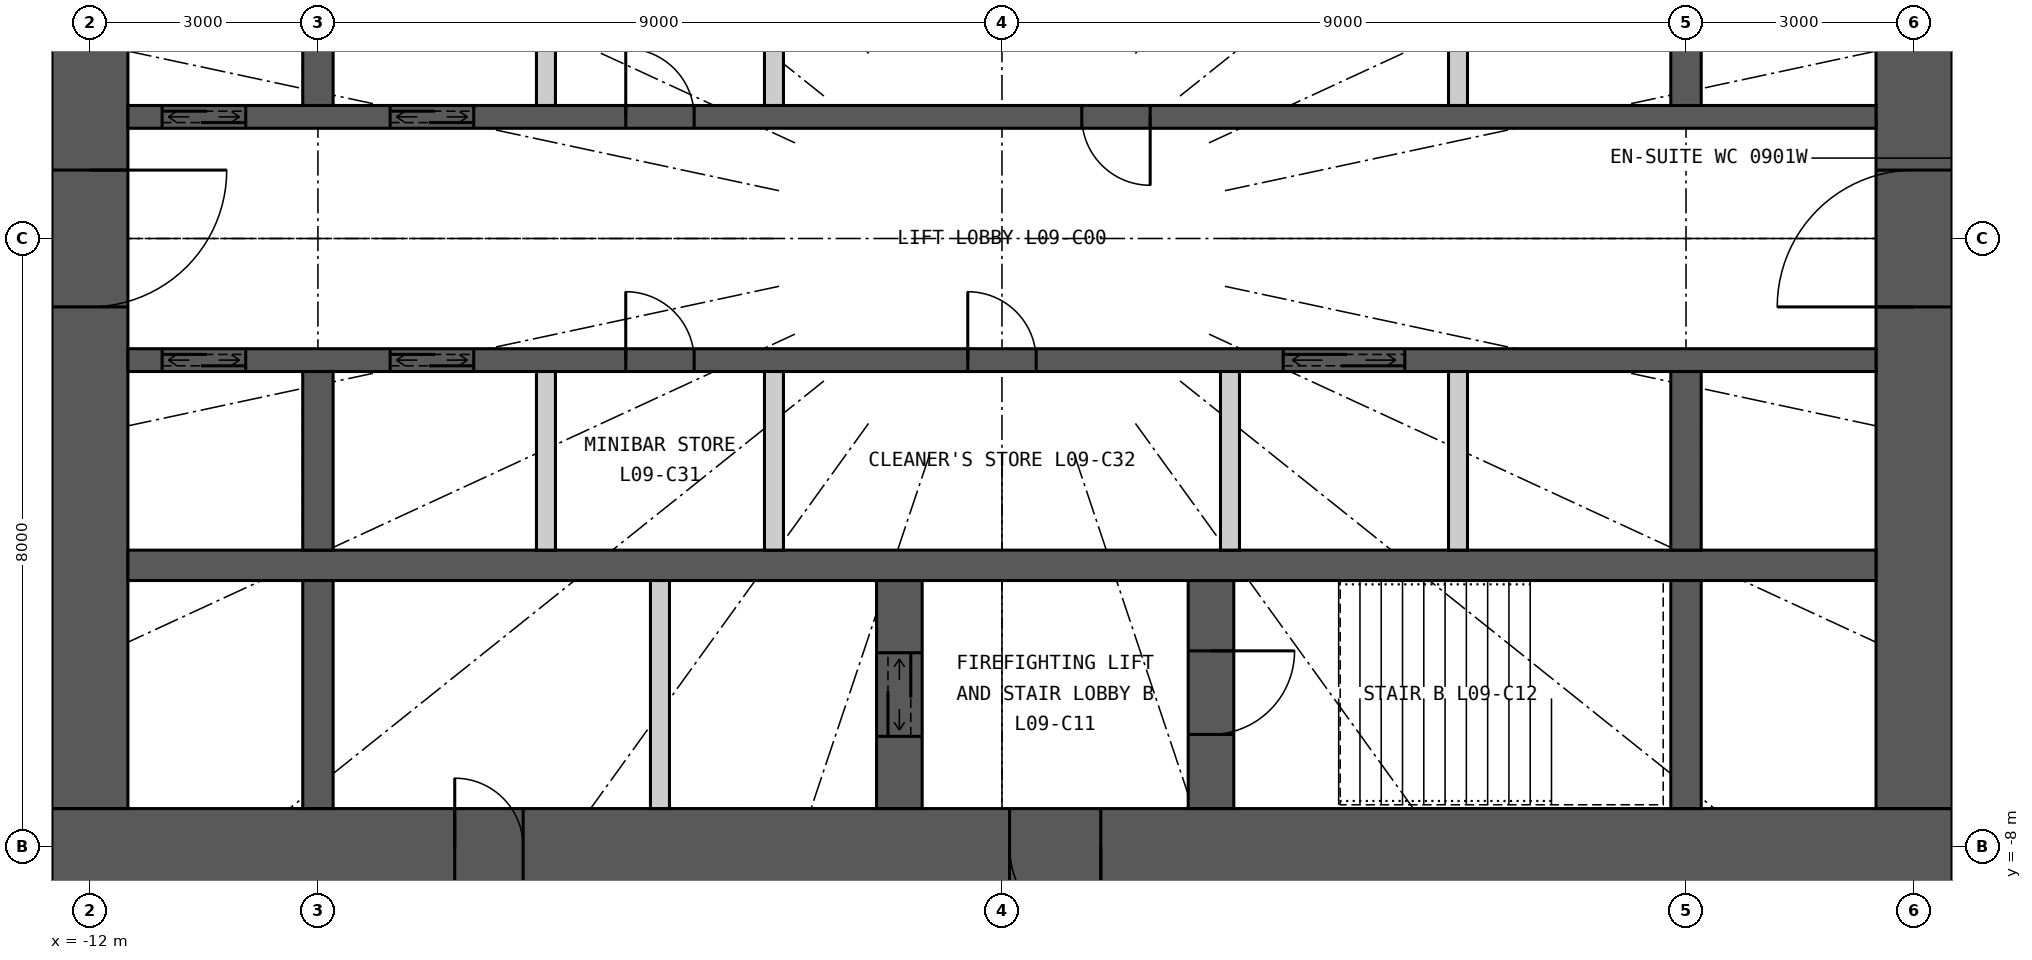
"""IFC4 building model, lengths in metres.
Left out: names, types, materials, properties, quantities, classifications, styles, units other than length and angle.
Written with IfcOpenShell. Run it as: python <this file> out.ifc"""

import sys

from ifc_helpers import new_model, si_unit, direction, frame, frame_2d, origin, place, context, subcontext, project, spatial, rectangle, extrude, element, fill, save


model = new_model("IFC4")
c1 = context("Model", 3, precision=1e-05, world=origin(), true_north=direction((0.0, 1.0)))
c2 = subcontext(c1, "Body", "Model", "MODEL_VIEW")
j1 = project(units=[si_unit("LENGTHUNIT", "METRE"), si_unit("PLANEANGLEUNIT", "RADIAN")], contexts=[c1])
p1 = place(None, origin())
s1 = spatial("IfcSite", under=j1, at=p1, CompositionType="ELEMENT")
p2 = place(p1, origin())
s2 = spatial("IfcBuilding", under=s1, at=p2, CompositionType="ELEMENT")
p3 = place(p2, frame((0.0, 0.0, 42.6)))
s3 = spatial("IfcBuildingStorey", under=s2, at=p3, CompositionType="ELEMENT", Elevation=42.6)
p4 = place(p3, frame((12.5, -8.0, 0.0), z_axis=(0.0, 0.0, 1.0), x_axis=(-1.0, 0.0, 0.0)))
e1 = element("IfcWall", 1, at=p4, inside=s3, PredefinedType="SHEAR", context=c2, shape_type="SweptSolid", body=[
    extrude(rectangle(XDim=25.0, YDim=1.0, at=frame_2d((12.5, 0.0))), origin(), (0.0, 0.0, 1.0), 3.3),
])
p5 = place(p4, frame((11.2, 0.0, 0.0)))
e2 = element("IfcOpeningElement", 2, at=p5, cuts=e1, PredefinedType="OPENING", context=c2, shape_type="SweptSolid", body=[
    extrude(rectangle(XDim=1.2, YDim=2.2, at=frame_2d((0.6, 1.1))), frame((0.0, 0.51, 0.0), z_axis=(0.0, -1.0, 0.0), x_axis=(1.0, 0.0, 0.0)), (0.0, 0.0, 1.0), 1.02),
])
p6 = place(p4, frame((18.8, 0.0, 0.0)))
e3 = element("IfcOpeningElement", 3, at=p6, cuts=e1, PredefinedType="OPENING", context=c2, shape_type="SweptSolid", body=[
    extrude(rectangle(XDim=0.9, YDim=2.2, at=frame_2d((0.45, 1.1))), frame((0.0, 0.51, 0.0), z_axis=(0.0, -1.0, 0.0), x_axis=(1.0, 0.0, 0.0)), (0.0, 0.0, 1.0), 1.02),
])
p7 = place(p3, frame((12.0, -7.5, 0.0), z_axis=(0.0, 0.0, 1.0), x_axis=(0.0, 1.0, 0.0)))
e4 = element("IfcWall", 4, at=p7, inside=s3, PredefinedType="SHEAR", context=c2, shape_type="SweptSolid", body=[
    extrude(rectangle(XDim=15.0, YDim=1.0, at=frame_2d((7.5, 0.0))), origin(), (0.0, 0.0, 1.0), 3.3),
])
p8 = place(p7, frame((6.6, 0.0, 0.0)))
e5 = element("IfcOpeningElement", 5, at=p8, cuts=e4, PredefinedType="OPENING", context=c2, shape_type="SweptSolid", body=[
    extrude(rectangle(XDim=1.8, YDim=2.2, at=frame_2d((0.9, 1.1))), frame((0.0, 0.51, 0.0), z_axis=(0.0, -1.0, 0.0), x_axis=(1.0, 0.0, 0.0)), (0.0, 0.0, 1.0), 1.02),
])
p9 = place(p3, frame((-12.0, 7.5, 0.0), z_axis=(0.0, 0.0, 1.0), x_axis=(0.0, -1.0, 0.0)))
e6 = element("IfcWall", 6, at=p9, inside=s3, PredefinedType="SHEAR", context=c2, shape_type="SweptSolid", body=[
    extrude(rectangle(XDim=15.0, YDim=1.0, at=frame_2d((7.5, 0.0))), origin(), (0.0, 0.0, 1.0), 3.3),
])
p10 = place(p9, frame((6.6, 0.0, 0.0)))
e7 = element("IfcOpeningElement", 7, at=p10, cuts=e6, PredefinedType="OPENING", context=c2, shape_type="SweptSolid", body=[
    extrude(rectangle(XDim=1.8, YDim=2.2, at=frame_2d((0.9, 1.1))), frame((0.0, 0.51, 0.0), z_axis=(0.0, -1.0, 0.0), x_axis=(1.0, 0.0, 0.0)), (0.0, 0.0, 1.0), 1.02),
])
p11 = place(p3, frame((-11.5, 1.6, 0.0), z_axis=(0.0, 0.0, 1.0), x_axis=(1.0, 0.0, 0.0)))
e8 = element("IfcWall", 8, at=p11, inside=s3, PredefinedType="SHEAR", context=c2, shape_type="SweptSolid", body=[
    extrude(rectangle(XDim=23.0, YDim=0.3, at=frame_2d((11.5, 0.0))), origin(), (0.0, 0.0, 1.0), 3.3),
])
p12 = place(p11, frame((0.45, 0.0, 0.0)))
e9 = element("IfcOpeningElement", 9, at=p12, cuts=e8, PredefinedType="OPENING", context=c2, shape_type="SweptSolid", body=[
    extrude(rectangle(XDim=1.1, YDim=2.2, at=frame_2d((0.55, 1.1))), frame((0.0, 0.16, 0.0), z_axis=(0.0, -1.0, 0.0), x_axis=(1.0, 0.0, 0.0)), (0.0, 0.0, 1.0), 0.32),
])
p13 = place(p11, frame((3.45, 0.0, 0.0)))
e10 = element("IfcOpeningElement", 10, at=p13, cuts=e8, PredefinedType="OPENING", context=c2, shape_type="SweptSolid", body=[
    extrude(rectangle(XDim=1.1, YDim=2.2, at=frame_2d((0.55, 1.1))), frame((0.0, 0.16, 0.0), z_axis=(0.0, -1.0, 0.0), x_axis=(1.0, 0.0, 0.0)), (0.0, 0.0, 1.0), 0.32),
])
p14 = place(p11, frame((6.55, 0.0, 0.0)))
e11 = element("IfcOpeningElement", 11, at=p14, cuts=e8, PredefinedType="OPENING", context=c2, shape_type="SweptSolid", body=[
    extrude(rectangle(XDim=0.9, YDim=2.2, at=frame_2d((0.45, 1.1))), frame((0.0, 0.16, 0.0), z_axis=(0.0, -1.0, 0.0), x_axis=(1.0, 0.0, 0.0)), (0.0, 0.0, 1.0), 0.32),
])
p15 = place(p11, frame((12.55, 0.0, 0.0)))
e12 = element("IfcOpeningElement", 12, at=p15, cuts=e8, PredefinedType="OPENING", context=c2, shape_type="SweptSolid", body=[
    extrude(rectangle(XDim=0.9, YDim=2.2, at=frame_2d((0.45, 1.1))), frame((0.0, 0.16, 0.0), z_axis=(0.0, -1.0, 0.0), x_axis=(1.0, 0.0, 0.0)), (0.0, 0.0, 1.0), 0.32),
])
p16 = place(p3, frame((-11.5, -4.3, 0.0), z_axis=(0.0, 0.0, 1.0), x_axis=(1.0, 0.0, 0.0)))
e13 = element("IfcWall", 13, at=p16, inside=s3, PredefinedType="SHEAR", context=c2, shape_type="SweptSolid", body=[
    extrude(rectangle(XDim=23.0, YDim=0.4, at=frame_2d((11.5, 0.0))), origin(), (0.0, 0.0, 1.0), 3.3),
])
p17 = place(p3, frame((-11.5, -1.6, 0.0), z_axis=(0.0, 0.0, 1.0), x_axis=(1.0, 0.0, 0.0)))
e14 = element("IfcWall", 14, at=p17, inside=s3, PredefinedType="SHEAR", context=c2, shape_type="SweptSolid", body=[
    extrude(rectangle(XDim=23.0, YDim=0.3, at=frame_2d((11.5, 0.0))), origin(), (0.0, 0.0, 1.0), 3.3),
])
p18 = place(p17, frame((0.45, 0.0, 0.0)))
e15 = element("IfcOpeningElement", 15, at=p18, cuts=e14, PredefinedType="OPENING", context=c2, shape_type="SweptSolid", body=[
    extrude(rectangle(XDim=1.1, YDim=2.2, at=frame_2d((0.55, 1.1))), frame((0.0, 0.16, 0.0), z_axis=(0.0, -1.0, 0.0), x_axis=(1.0, 0.0, 0.0)), (0.0, 0.0, 1.0), 0.32),
])
p19 = place(p17, frame((3.45, 0.0, 0.0)))
e16 = element("IfcOpeningElement", 16, at=p19, cuts=e14, PredefinedType="OPENING", context=c2, shape_type="SweptSolid", body=[
    extrude(rectangle(XDim=1.1, YDim=2.2, at=frame_2d((0.55, 1.1))), frame((0.0, 0.16, 0.0), z_axis=(0.0, -1.0, 0.0), x_axis=(1.0, 0.0, 0.0)), (0.0, 0.0, 1.0), 0.32),
])
p20 = place(p17, frame((15.2, 0.0, 0.0)))
e17 = element("IfcOpeningElement", 17, at=p20, cuts=e14, PredefinedType="OPENING", context=c2, shape_type="SweptSolid", body=[
    extrude(rectangle(XDim=1.6, YDim=2.4, at=frame_2d((0.8, 1.2))), frame((0.0, 0.16, 0.0), z_axis=(0.0, -1.0, 0.0), x_axis=(1.0, 0.0, 0.0)), (0.0, 0.0, 1.0), 0.32),
])
p21 = place(p17, frame((6.55, 0.0, 0.0)))
e18 = element("IfcOpeningElement", 18, at=p21, cuts=e14, PredefinedType="OPENING", context=c2, shape_type="SweptSolid", body=[
    extrude(rectangle(XDim=0.9, YDim=2.2, at=frame_2d((0.45, 1.1))), frame((0.0, 0.16, 0.0), z_axis=(0.0, -1.0, 0.0), x_axis=(1.0, 0.0, 0.0)), (0.0, 0.0, 1.0), 0.32),
])
p22 = place(p17, frame((11.05, 0.0, 0.0)))
e19 = element("IfcOpeningElement", 19, at=p22, cuts=e14, PredefinedType="OPENING", context=c2, shape_type="SweptSolid", body=[
    extrude(rectangle(XDim=0.9, YDim=2.2, at=frame_2d((0.45, 1.1))), frame((0.0, 0.16, 0.0), z_axis=(0.0, -1.0, 0.0), x_axis=(1.0, 0.0, 0.0)), (0.0, 0.0, 1.0), 0.32),
])
for number, where, z_axis, x_axis in (
    (20, (-9.0, 1.75, 0.0), (0.0, 0.0, 1.0), (0.0, 1.0, 0.0)),
    (21, (-9.0, -4.1, 0.0), (0.0, 0.0, 1.0), (0.0, 1.0, 0.0)),
):
    element("IfcWall", number, at=place(p3, frame(where, z_axis=z_axis, x_axis=x_axis)), inside=s3, PredefinedType="SHEAR", context=c2, shape_type="SweptSolid", body=[
        extrude(rectangle(XDim=2.35, YDim=0.4, at=frame_2d((1.175, 0.0))), origin(), (0.0, 0.0, 1.0), 3.3),
    ])
p23 = place(p3, frame((-9.0, -7.5, 0.0), z_axis=(0.0, 0.0, 1.0), x_axis=(0.0, 1.0, 0.0)))
e22 = element("IfcWall", 22, at=p23, inside=s3, PredefinedType="SHEAR", context=c2, shape_type="SweptSolid", body=[
    extrude(rectangle(XDim=3.0, YDim=0.4, at=frame_2d((1.5, 0.0))), origin(), (0.0, 0.0, 1.0), 3.3),
])
for number, where, z_axis, x_axis in (
    (23, (9.0, 1.75, 0.0), (0.0, 0.0, 1.0), (0.0, 1.0, 0.0)),
    (24, (9.0, -4.1, 0.0), (0.0, 0.0, 1.0), (0.0, 1.0, 0.0)),
):
    element("IfcWall", number, at=place(p3, frame(where, z_axis=z_axis, x_axis=x_axis)), inside=s3, PredefinedType="SHEAR", context=c2, shape_type="SweptSolid", body=[
        extrude(rectangle(XDim=2.35, YDim=0.4, at=frame_2d((1.175, 0.0))), origin(), (0.0, 0.0, 1.0), 3.3),
    ])
p24 = place(p3, frame((9.0, -7.5, 0.0), z_axis=(0.0, 0.0, 1.0), x_axis=(0.0, 1.0, 0.0)))
e25 = element("IfcWall", 25, at=p24, inside=s3, PredefinedType="SHEAR", context=c2, shape_type="SweptSolid", body=[
    extrude(rectangle(XDim=3.0, YDim=0.4, at=frame_2d((1.5, 0.0))), origin(), (0.0, 0.0, 1.0), 3.3),
])
p25 = place(p3, frame((2.75, -7.5, 0.0), z_axis=(0.0, 0.0, 1.0), x_axis=(0.0, 1.0, 0.0)))
e26 = element("IfcWall", 26, at=p25, inside=s3, PredefinedType="SHEAR", context=c2, shape_type="SweptSolid", body=[
    extrude(rectangle(XDim=3.0, YDim=0.6, at=frame_2d((1.5, 0.0))), origin(), (0.0, 0.0, 1.0), 3.3),
])
p26 = place(p25, frame((0.975, 0.0, 0.0)))
e27 = element("IfcOpeningElement", 27, at=p26, cuts=e26, PredefinedType="OPENING", context=c2, shape_type="SweptSolid", body=[
    extrude(rectangle(XDim=1.1, YDim=2.2, at=frame_2d((0.55, 1.1))), frame((0.0, 0.31, 0.0), z_axis=(0.0, -1.0, 0.0), x_axis=(1.0, 0.0, 0.0)), (0.0, 0.0, 1.0), 0.62),
])
p27 = place(p3, frame((-1.35, -7.5, 0.0), z_axis=(0.0, 0.0, 1.0), x_axis=(0.0, 1.0, 0.0)))
e28 = element("IfcWall", 28, at=p27, inside=s3, PredefinedType="SHEAR", context=c2, shape_type="SweptSolid", body=[
    extrude(rectangle(XDim=3.0, YDim=0.6, at=frame_2d((1.5, 0.0))), origin(), (0.0, 0.0, 1.0), 3.3),
])
p28 = place(p27, frame((0.95, 0.0, 0.0)))
e29 = element("IfcOpeningElement", 29, at=p28, cuts=e28, PredefinedType="OPENING", context=c2, shape_type="SweptSolid", body=[
    extrude(rectangle(XDim=1.1, YDim=2.2, at=frame_2d((0.55, 1.1))), frame((0.0, 0.31, 0.0), z_axis=(0.0, -1.0, 0.0), x_axis=(1.0, 0.0, 0.0)), (0.0, 0.0, 1.0), 0.62),
])
p29 = place(p3, frame((-4.5, -7.5, 0.0), z_axis=(0.0, 0.0, 1.0), x_axis=(0.0, 1.0, 0.0)))
e30 = element("IfcWall", 30, at=p29, inside=s3, PredefinedType="PARTITIONING", context=c2, shape_type="SweptSolid", body=[
    extrude(rectangle(XDim=3.0, YDim=0.25, at=frame_2d((1.5, 0.0))), origin(), (0.0, 0.0, 1.0), 3.3),
])
for number, where, z_axis, x_axis in (
    (31, (-6.0, 1.75, 0.0), (0.0, 0.0, 1.0), (0.0, 1.0, 0.0)),
    (32, (-3.0, 1.75, 0.0), (0.0, 0.0, 1.0), (0.0, 1.0, 0.0)),
    (33, (6.0, 1.75, 0.0), (0.0, 0.0, 1.0), (0.0, 1.0, 0.0)),
    (34, (-6.0, -4.1, 0.0), (0.0, 0.0, 1.0), (0.0, 1.0, 0.0)),
    (35, (-3.0, -4.1, 0.0), (0.0, 0.0, 1.0), (0.0, 1.0, 0.0)),
    (36, (3.0, -4.1, 0.0), (0.0, 0.0, 1.0), (0.0, 1.0, 0.0)),
    (37, (6.0, -4.1, 0.0), (0.0, 0.0, 1.0), (0.0, 1.0, 0.0)),
):
    element("IfcWall", number, at=place(p3, frame(where, z_axis=z_axis, x_axis=x_axis)), inside=s3, PredefinedType="PARTITIONING", context=c2, shape_type="SweptSolid", body=[
        extrude(rectangle(XDim=2.35, YDim=0.25, at=frame_2d((1.175, 0.0))), origin(), (0.0, 0.0, 1.0), 3.3),
    ])
p30 = place(p5, origin())
e38 = element("IfcDoor", 38, at=p30, inside=s3, OperationType="SINGLE_SWING_LEFT", PredefinedType="DOOR", context=c2, shape_type="SweptSolid", body=[
    extrude(rectangle(XDim=1.2, YDim=2.2, at=frame_2d((0.6, 1.1))), frame((0.0, 0.025, 0.0), z_axis=(0.0, -1.0, 0.0), x_axis=(1.0, 0.0, 0.0)), (0.0, 0.0, 1.0), 0.05),
])
fill(e2, e38)
p31 = place(p26, origin())
e39 = element("IfcDoor", 39, at=p31, inside=s3, OperationType="SINGLE_SWING_RIGHT", PredefinedType="DOOR", context=c2, shape_type="SweptSolid", body=[
    extrude(rectangle(XDim=1.1, YDim=2.2, at=frame_2d((0.55, 1.1))), frame((0.0, 0.025, 0.0), z_axis=(0.0, -1.0, 0.0), x_axis=(1.0, 0.0, 0.0)), (0.0, 0.0, 1.0), 0.05),
])
fill(e27, e39)
p32 = place(p28, origin())
e40 = element("IfcDoor", 40, at=p32, inside=s3, OperationType="DOUBLE_DOOR_SLIDING", PredefinedType="DOOR", context=c2, shape_type="SweptSolid", body=[
    extrude(rectangle(XDim=1.1, YDim=2.2, at=frame_2d((0.55, 1.1))), frame((0.0, 0.025, 0.0), z_axis=(0.0, -1.0, 0.0), x_axis=(1.0, 0.0, 0.0)), (0.0, 0.0, 1.0), 0.05),
])
fill(e29, e40)
p33 = place(p6, origin())
e41 = element("IfcDoor", 41, at=p33, inside=s3, OperationType="SINGLE_SWING_RIGHT", PredefinedType="DOOR", context=c2, shape_type="SweptSolid", body=[
    extrude(rectangle(XDim=0.9, YDim=2.2, at=frame_2d((0.45, 1.1))), frame((0.0, 0.025, 0.0), z_axis=(0.0, -1.0, 0.0), x_axis=(1.0, 0.0, 0.0)), (0.0, 0.0, 1.0), 0.05),
])
fill(e3, e41)
p34 = place(p12, origin())
e42 = element("IfcDoor", 42, at=p34, inside=s3, OperationType="DOUBLE_DOOR_SLIDING", PredefinedType="DOOR", context=c2, shape_type="SweptSolid", body=[
    extrude(rectangle(XDim=1.1, YDim=2.2, at=frame_2d((0.55, 1.1))), frame((0.0, 0.025, 0.0), z_axis=(0.0, -1.0, 0.0), x_axis=(1.0, 0.0, 0.0)), (0.0, 0.0, 1.0), 0.05),
])
fill(e9, e42)
p35 = place(p13, origin())
e43 = element("IfcDoor", 43, at=p35, inside=s3, OperationType="DOUBLE_DOOR_SLIDING", PredefinedType="DOOR", context=c2, shape_type="SweptSolid", body=[
    extrude(rectangle(XDim=1.1, YDim=2.2, at=frame_2d((0.55, 1.1))), frame((0.0, 0.025, 0.0), z_axis=(0.0, -1.0, 0.0), x_axis=(1.0, 0.0, 0.0)), (0.0, 0.0, 1.0), 0.05),
])
fill(e10, e43)
p36 = place(p18, origin())
e44 = element("IfcDoor", 44, at=p36, inside=s3, OperationType="DOUBLE_DOOR_SLIDING", PredefinedType="DOOR", context=c2, shape_type="SweptSolid", body=[
    extrude(rectangle(XDim=1.1, YDim=2.2, at=frame_2d((0.55, 1.1))), frame((0.0, 0.025, 0.0), z_axis=(0.0, -1.0, 0.0), x_axis=(1.0, 0.0, 0.0)), (0.0, 0.0, 1.0), 0.05),
])
fill(e15, e44)
p37 = place(p19, origin())
e45 = element("IfcDoor", 45, at=p37, inside=s3, OperationType="DOUBLE_DOOR_SLIDING", PredefinedType="DOOR", context=c2, shape_type="SweptSolid", body=[
    extrude(rectangle(XDim=1.1, YDim=2.2, at=frame_2d((0.55, 1.1))), frame((0.0, 0.025, 0.0), z_axis=(0.0, -1.0, 0.0), x_axis=(1.0, 0.0, 0.0)), (0.0, 0.0, 1.0), 0.05),
])
fill(e16, e45)
p38 = place(p20, origin())
e46 = element("IfcDoor", 46, at=p38, inside=s3, OperationType="DOUBLE_DOOR_SLIDING", PredefinedType="DOOR", context=c2, shape_type="SweptSolid", body=[
    extrude(rectangle(XDim=1.6, YDim=2.4, at=frame_2d((0.8, 1.2))), frame((0.0, 0.025, 0.0), z_axis=(0.0, -1.0, 0.0), x_axis=(1.0, 0.0, 0.0)), (0.0, 0.0, 1.0), 0.05),
])
fill(e17, e46)
p39 = place(p14, origin())
e47 = element("IfcDoor", 47, at=p39, inside=s3, OperationType="SINGLE_SWING_LEFT", PredefinedType="DOOR", context=c2, shape_type="SweptSolid", body=[
    extrude(rectangle(XDim=0.9, YDim=2.2, at=frame_2d((0.45, 1.1))), frame((0.0, 0.025, 0.0), z_axis=(0.0, -1.0, 0.0), x_axis=(1.0, 0.0, 0.0)), (0.0, 0.0, 1.0), 0.05),
])
fill(e11, e47)
p40 = place(p15, origin())
e48 = element("IfcDoor", 48, at=p40, inside=s3, OperationType="SINGLE_SWING_RIGHT", PredefinedType="DOOR", context=c2, shape_type="SweptSolid", body=[
    extrude(rectangle(XDim=0.9, YDim=2.2, at=frame_2d((0.45, 1.1))), frame((0.0, 0.025, 0.0), z_axis=(0.0, -1.0, 0.0), x_axis=(1.0, 0.0, 0.0)), (0.0, 0.0, 1.0), 0.05),
])
fill(e12, e48)
p41 = place(p21, origin())
e49 = element("IfcDoor", 49, at=p41, inside=s3, OperationType="SINGLE_SWING_LEFT", PredefinedType="DOOR", context=c2, shape_type="SweptSolid", body=[
    extrude(rectangle(XDim=0.9, YDim=2.2, at=frame_2d((0.45, 1.1))), frame((0.0, 0.025, 0.0), z_axis=(0.0, -1.0, 0.0), x_axis=(1.0, 0.0, 0.0)), (0.0, 0.0, 1.0), 0.05),
])
fill(e18, e49)
p42 = place(p22, origin())
e50 = element("IfcDoor", 50, at=p42, inside=s3, OperationType="SINGLE_SWING_LEFT", PredefinedType="DOOR", context=c2, shape_type="SweptSolid", body=[
    extrude(rectangle(XDim=0.9, YDim=2.2, at=frame_2d((0.45, 1.1))), frame((0.0, 0.025, 0.0), z_axis=(0.0, -1.0, 0.0), x_axis=(1.0, 0.0, 0.0)), (0.0, 0.0, 1.0), 0.05),
])
fill(e19, e50)
p43 = place(p8, origin())
e51 = element("IfcDoor", 51, at=p43, inside=s3, OperationType="DOUBLE_DOOR_DOUBLE_SWING", PredefinedType="DOOR", context=c2, shape_type="SweptSolid", body=[
    extrude(rectangle(XDim=1.8, YDim=2.2, at=frame_2d((0.9, 1.1))), frame((0.0, 0.025, 0.0), z_axis=(0.0, -1.0, 0.0), x_axis=(1.0, 0.0, 0.0)), (0.0, 0.0, 1.0), 0.05),
])
fill(e5, e51)
p44 = place(p10, origin())
e52 = element("IfcDoor", 52, at=p44, inside=s3, OperationType="DOUBLE_DOOR_DOUBLE_SWING", PredefinedType="DOOR", context=c2, shape_type="SweptSolid", body=[
    extrude(rectangle(XDim=1.8, YDim=2.2, at=frame_2d((0.9, 1.1))), frame((0.0, 0.025, 0.0), z_axis=(0.0, -1.0, 0.0), x_axis=(1.0, 0.0, 0.0)), (0.0, 0.0, 1.0), 0.05),
])
fill(e7, e52)
save(model, sys.argv[1])
